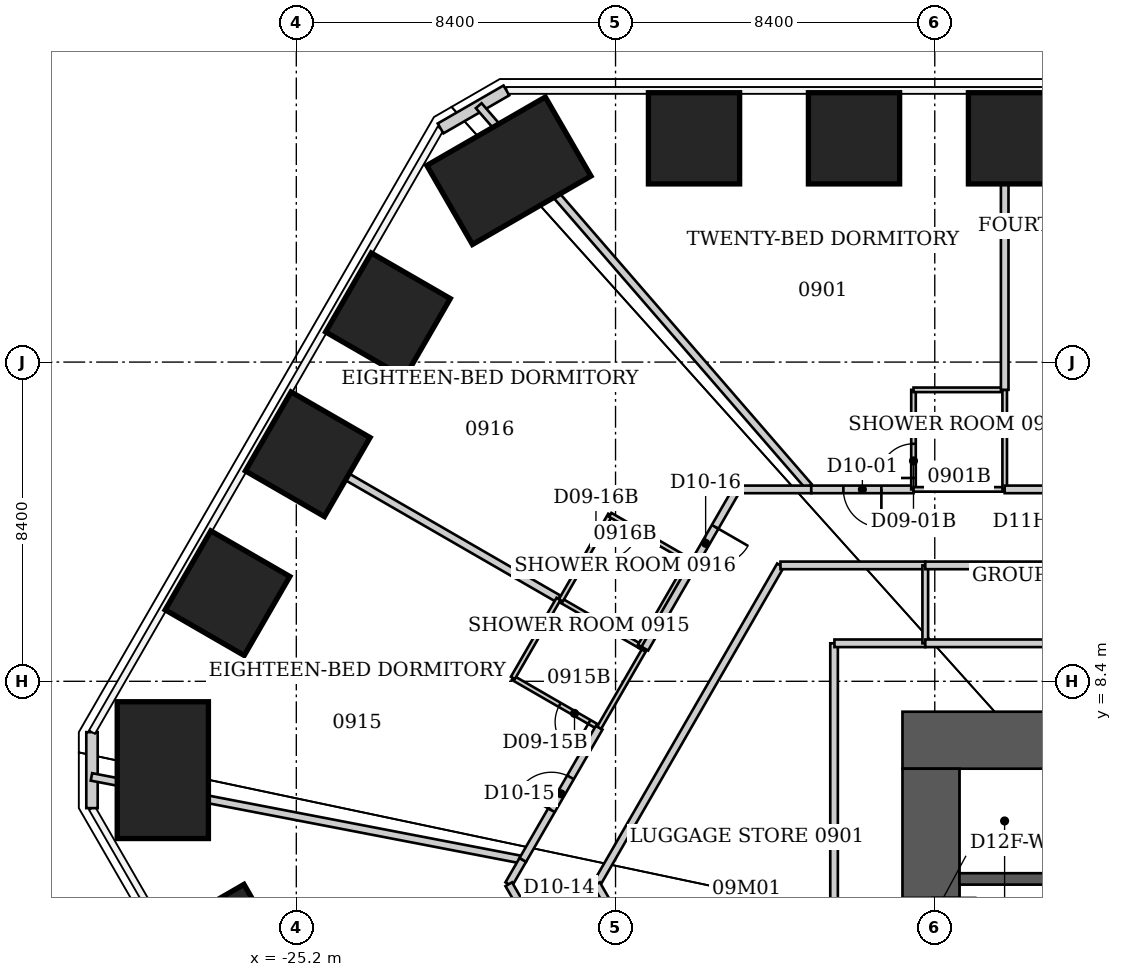
"""IFC4 building model, lengths in metres.
Left out: names, types, materials, properties, quantities, classifications, styles, units other than length and angle.
Written with IfcOpenShell. Run it as: python <this file> out.ifc"""

import sys

from ifc_helpers import new_model, si_unit, direction, frame, frame_2d, origin, origin_2d, place, context, subcontext, project, spatial, rectangle, extrude, element, fill, save


model = new_model("IFC4")
c1 = context("Model", 3, precision=1e-05, world=origin(), true_north=direction((0.0, 1.0)))
c2 = subcontext(c1, "Body", "Model", "MODEL_VIEW")
j1 = project(units=[si_unit("LENGTHUNIT", "METRE"), si_unit("PLANEANGLEUNIT", "RADIAN")], contexts=[c1])
p1 = place(None, origin())
s1 = spatial("IfcSite", under=j1, at=p1, CompositionType="ELEMENT")
p2 = place(p1, origin())
s2 = spatial("IfcBuilding", under=s1, at=p2, CompositionType="ELEMENT")
p3 = place(p2, frame((0.0, 0.0, 42.0)))
s3 = spatial("IfcBuildingStorey", under=s2, at=p3, CompositionType="ELEMENT", Elevation=42.0)
for number, where, z_axis, x_axis in (
    (1, (-14.735, 22.689, 0.0), (0.0, 0.0, 1.0), (0.0, 1.0, 0.0)),
    (2, (-10.525, 22.689, 0.0), (0.0, 0.0, 1.0), (0.0, 1.0, 0.0)),
    (3, (-6.315, 22.689, 0.0), (0.0, 0.0, 1.0), (0.0, 1.0, 0.0)),
    (4, (-27.016, 1.416, 0.0), (0.0, 0.0, 1.0), (-0.866, -0.5, 0.0)),
):
    element("IfcColumn", number, at=place(p3, frame(where, z_axis=z_axis, x_axis=x_axis)), inside=s3, PredefinedType="COLUMN", context=c2, shape_type="SweptSolid", body=[
        extrude(rectangle(XDim=2.4, YDim=2.4, at=origin_2d()), origin(), (0.0, 0.0, 1.0), 3.8),
    ])
p4 = place(p3, frame((-28.713, 6.062, 0.0), z_axis=(0.0, 0.0, 1.0), x_axis=(-1.0, 0.0, 0.0)))
e5 = element("IfcColumn", 5, at=p4, inside=s3, PredefinedType="COLUMN", context=c2, shape_type="SweptSolid", body=[
    extrude(rectangle(XDim=2.4, YDim=3.6, at=origin_2d()), origin(), (0.0, 0.0, 1.0), 3.8),
])
for number, where, z_axis, x_axis in (
    (6, (-27.01, 10.719, 0.0), (0.0, 0.0, 1.0), (-0.866, 0.5, 0.0)),
    (7, (-24.899, 14.375, 0.0), (0.0, 0.0, 1.0), (-0.866, 0.5, 0.0)),
    (8, (-22.788, 18.032, 0.0), (0.0, 0.0, 1.0), (-0.866, 0.5, 0.0)),
):
    element("IfcColumn", number, at=place(p3, frame(where, z_axis=z_axis, x_axis=x_axis)), inside=s3, PredefinedType="COLUMN", context=c2, shape_type="SweptSolid", body=[
        extrude(rectangle(XDim=2.4, YDim=2.4, at=origin_2d()), origin(), (0.0, 0.0, 1.0), 3.8),
    ])
p5 = place(p3, frame((-19.606, 21.835, 0.0), z_axis=(0.0, 0.0, 1.0), x_axis=(-0.5, 0.866025403784, 0.0)))
e9 = element("IfcColumn", 9, at=p5, inside=s3, PredefinedType="COLUMN", context=c2, shape_type="SweptSolid", body=[
    extrude(rectangle(XDim=2.4, YDim=3.6, at=origin_2d()), origin(), (0.0, 0.0, 1.0), 3.8),
])
p6 = place(p3, frame((-9.25, 6.85, 0.0), z_axis=(0.0, 0.0, 1.0), x_axis=(1.0, 0.0, 0.0)))
e10 = element("IfcWall", 10, at=p6, inside=s3, PredefinedType="SHEAR", context=c2, shape_type="SweptSolid", body=[
    extrude(rectangle(XDim=18.5, YDim=1.5, at=frame_2d((9.25, 0.0))), origin(), (0.0, 0.0, 1.0), 3.8),
])
p7 = place(p3, frame((-8.5, -9.2, 0.0), z_axis=(0.0, 0.0, 1.0), x_axis=(0.0, 1.0, 0.0)))
e11 = element("IfcWall", 11, at=p7, inside=s3, PredefinedType="SHEAR", context=c2, shape_type="SweptSolid", body=[
    extrude(rectangle(XDim=15.3, YDim=1.5, at=frame_2d((7.65, 0.0))), origin(), (0.0, 0.0, 1.0), 3.8),
])
p8 = place(p7, frame((10.7, 0.0, 0.0)))
e12 = element("IfcOpeningElement", 12, at=p8, cuts=e11, PredefinedType="OPENING", context=c2, shape_type="SweptSolid", body=[
    extrude(rectangle(XDim=1.2, YDim=2.2, at=frame_2d((0.6, 1.1))), frame((0.0, 0.75, 0.0), z_axis=(0.0, -1.0, 0.0), x_axis=(1.0, 0.0, 0.0)), (0.0, 0.0, 1.0), 1.5),
])
p9 = place(p3, frame((-7.75, 3.2, 0.0), z_axis=(0.0, 0.0, 1.0), x_axis=(1.0, 0.0, 0.0)))
e13 = element("IfcWall", 13, at=p9, inside=s3, PredefinedType="SHEAR", context=c2, shape_type="SweptSolid", body=[
    extrude(rectangle(XDim=15.5, YDim=0.3, at=frame_2d((7.75, 0.0))), origin(), (0.0, 0.0, 1.0), 3.8),
])
p10 = place(p9, frame((5.944, 0.0, 0.0)))
e14 = element("IfcOpeningElement", 14, at=p10, cuts=e13, PredefinedType="OPENING", context=c2, shape_type="SweptSolid", body=[
    extrude(rectangle(XDim=1.1, YDim=2.2, at=frame_2d((0.55, 1.1))), frame((0.0, 0.15, 0.0), z_axis=(0.0, -1.0, 0.0), x_axis=(1.0, 0.0, 0.0)), (0.0, 0.0, 1.0), 0.3),
])
p11 = place(p9, frame((11.144, 0.0, 0.0)))
e15 = element("IfcOpeningElement", 15, at=p11, cuts=e13, PredefinedType="OPENING", context=c2, shape_type="SweptSolid", body=[
    extrude(rectangle(XDim=1.1, YDim=2.2, at=frame_2d((0.55, 1.1))), frame((0.0, 0.15, 0.0), z_axis=(0.0, -1.0, 0.0), x_axis=(1.0, 0.0, 0.0)), (0.0, 0.0, 1.0), 0.3),
])
for number, where, z_axis, x_axis in (
    (16, (-30.576, 5.062, 0.0), (0.0, 0.0, 1.0), (0.0, 1.0, 0.0)),
    (17, (-21.404, 22.949, 0.0), (0.0, 0.0, 1.0), (0.866, 0.5, 0.0)),
):
    element("IfcWall", number, at=place(p3, frame(where, z_axis=z_axis, x_axis=x_axis)), inside=s3, PredefinedType="SOLIDWALL", context=c2, shape_type="SweptSolid", body=[
        extrude(rectangle(XDim=2.0, YDim=0.3, at=frame_2d((1.0, 0.0))), origin(), (0.0, 0.0, 1.0), 3.64),
    ])
p12 = place(p3, frame((-30.591, 5.884, 0.0), z_axis=(0.0, 0.0, 1.0), x_axis=(0.981983289605, -0.188967772219, 0.0)))
e18 = element("IfcWall", 18, at=p12, inside=s3, PredefinedType="PARTITIONING", context=c2, shape_type="SweptSolid", body=[
    extrude(rectangle(XDim=11.509, YDim=0.2, at=frame_2d((5.754, 0.0))), origin(), (0.0, 0.0, 1.0), 3.64),
])
p13 = place(p3, frame((-25.886, 14.95, 0.0), z_axis=(0.0, 0.0, 1.0), x_axis=(0.866018495177, -0.500011965869, 0.0)))
e19 = element("IfcWall", 19, at=p13, inside=s3, PredefinedType="PARTITIONING", context=c2, shape_type="SweptSolid", body=[
    extrude(rectangle(XDim=8.76, YDim=0.2, at=frame_2d((4.38, 0.0))), origin(), (0.0, 0.0, 1.0), 2.86),
])
p14 = place(p3, frame((-19.61, 3.06, 0.0), z_axis=(0.0, 0.0, 1.0), x_axis=(0.50068472101, 0.865629718844, 0.0)))
e20 = element("IfcWall", 20, at=p14, inside=s3, PredefinedType="PARTITIONING", context=c2, shape_type="SweptSolid", body=[
    extrude(rectangle(XDim=0.739, YDim=0.2, at=frame_2d((0.37, 0.0))), origin(), (0.0, 0.0, 1.0), 3.64),
])
p15 = place(p3, frame((-19.61, 3.06, 0.0), z_axis=(0.0, 0.0, 1.0), x_axis=(0.499983910424, -0.866034692906, 0.0)))
e21 = element("IfcWall", 21, at=p15, inside=s3, PredefinedType="PARTITIONING", context=c2, shape_type="SweptSolid", body=[
    extrude(rectangle(XDim=5.901, YDim=0.2, at=frame_2d((2.95, 0.0))), origin(), (0.0, 0.0, 1.0), 3.64),
])
p16 = place(p15, frame((2.15, 0.0, 0.0)))
e22 = element("IfcOpeningElement", 22, at=p16, cuts=e21, PredefinedType="OPENING", context=c2, shape_type="SweptSolid", body=[
    extrude(rectangle(XDim=1.0, YDim=2.13, at=frame_2d((0.5, 1.065))), frame((0.0, 0.1, 0.0), z_axis=(0.0, -1.0, 0.0), x_axis=(1.0, 0.0, 0.0)), (0.0, 0.0, 1.0), 0.2),
])
p17 = place(p3, frame((-19.5, 8.49, 0.0), z_axis=(0.0, 0.0, 1.0), x_axis=(0.866114241029, -0.499846097802, 0.0)))
e23 = element("IfcWall", 23, at=p17, inside=s3, PredefinedType="PARTITIONING", context=c2, shape_type="SweptSolid", body=[
    extrude(rectangle(XDim=2.621, YDim=0.12, at=frame_2d((1.311, 0.0))), origin(), (0.0, 0.0, 1.0), 3.64),
])
p18 = place(p17, frame((1.421, 0.0, 0.0)))
e24 = element("IfcOpeningElement", 24, at=p18, cuts=e23, PredefinedType="OPENING", context=c2, shape_type="SweptSolid", body=[
    extrude(rectangle(XDim=0.9, YDim=2.03, at=frame_2d((0.45, 1.015))), frame((0.0, 0.06, 0.0), z_axis=(0.0, -1.0, 0.0), x_axis=(1.0, 0.0, 0.0)), (0.0, 0.0, 1.0), 0.12),
])
p19 = place(p3, frame((-19.24, 3.7, 0.0), z_axis=(0.0, 0.0, 1.0), x_axis=(0.500157149565, 0.865934654428, 0.0)))
e25 = element("IfcWall", 25, at=p19, inside=s3, PredefinedType="PARTITIONING", context=c2, shape_type="SweptSolid", body=[
    extrude(rectangle(XDim=4.019, YDim=0.2, at=frame_2d((2.009, 0.0))), origin(), (0.0, 0.0, 1.0), 3.64),
])
p20 = place(p19, frame((1.51, 0.0, 0.0)))
e26 = element("IfcOpeningElement", 26, at=p20, cuts=e25, PredefinedType="OPENING", context=c2, shape_type="SweptSolid", body=[
    extrude(rectangle(XDim=1.0, YDim=2.13, at=frame_2d((0.5, 1.065))), frame((0.0, 0.1, 0.0), z_axis=(0.0, -1.0, 0.0), x_axis=(1.0, 0.0, 0.0)), (0.0, 0.0, 1.0), 0.2),
])
p21 = place(p3, frame((-18.3, 10.57, 0.0), z_axis=(0.0, 0.0, 1.0), x_axis=(-0.499693115345, -0.866202511239, 0.0)))
e27 = element("IfcWall", 27, at=p21, inside=s3, PredefinedType="PARTITIONING", context=c2, shape_type="SweptSolid", body=[
    extrude(rectangle(XDim=2.401, YDim=0.12, at=frame_2d((1.201, 0.0))), origin(), (0.0, 0.0, 1.0), 3.64),
])
p22 = place(p3, frame((-18.24, 10.53, 0.0), z_axis=(0.0, 0.0, 1.0), x_axis=(0.866202511239, -0.499693115345, 0.0)))
e28 = element("IfcWall", 28, at=p22, inside=s3, PredefinedType="PARTITIONING", context=c2, shape_type="SweptSolid", body=[
    extrude(rectangle(XDim=2.401, YDim=0.12, at=frame_2d((1.201, 0.0))), origin(), (0.0, 0.0, 1.0), 2.86),
])
p23 = place(p3, frame((-17.3, 3.06, 0.0), z_axis=(0.0, 0.0, 1.0), x_axis=(0.499704269421, 0.866196076603, 0.0)))
e29 = element("IfcWall", 29, at=p23, inside=s3, PredefinedType="PARTITIONING", context=c2, shape_type="SweptSolid", body=[
    extrude(rectangle(XDim=9.686, YDim=0.2, at=frame_2d((4.843, 0.0))), origin(), (0.0, 0.0, 1.0), 3.64),
])
p24 = place(p3, frame((-17.23, 7.18, 0.0), z_axis=(0.0, 0.0, 1.0), x_axis=(0.500009943768, 0.866019662671, 0.0)))
e30 = element("IfcWall", 30, at=p24, inside=s3, PredefinedType="PARTITIONING", context=c2, shape_type="SweptSolid", body=[
    extrude(rectangle(XDim=2.401, YDim=0.12, at=frame_2d((1.201, 0.0))), origin(), (0.0, 0.0, 1.0), 3.64),
])
p25 = place(p3, frame((-16.94, 12.78, 0.0), z_axis=(0.0, 0.0, 1.0), x_axis=(-0.500291685314, -0.865856933682, 0.0)))
e31 = element("IfcWall", 31, at=p25, inside=s3, PredefinedType="PARTITIONING", context=c2, shape_type="SweptSolid", body=[
    extrude(rectangle(XDim=2.599, YDim=0.12, at=frame_2d((1.299, 0.0))), origin(), (0.0, 0.0, 1.0), 3.64),
])
p26 = place(p25, frame((0.3, 0.0, 0.0)))
e32 = element("IfcOpeningElement", 32, at=p26, cuts=e31, PredefinedType="OPENING", context=c2, shape_type="SweptSolid", body=[
    extrude(rectangle(XDim=0.9, YDim=2.03, at=frame_2d((0.45, 1.015))), frame((0.0, 0.06, 0.0), z_axis=(0.0, -1.0, 0.0), x_axis=(1.0, 0.0, 0.0)), (0.0, 0.0, 1.0), 0.12),
])
p27 = place(p3, frame((-16.16, 9.33, 0.0), z_axis=(0.0, 0.0, 1.0), x_axis=(0.880098986228, -0.47479024257, 0.0)))
e33 = element("IfcWall", 33, at=p27, inside=s3, PredefinedType="PARTITIONING", context=c2, shape_type="SweptSolid", body=[
    extrude(rectangle(XDim=0.147, YDim=0.12, at=frame_2d((0.074, 0.0))), origin(), (0.0, 0.0, 1.0), 3.64),
])
p28 = place(p3, frame((-16.16, 9.33, 0.0), z_axis=(0.0, 0.0, 1.0), x_axis=(0.500291685314, 0.865856933682, 0.0)))
e34 = element("IfcWall", 34, at=p28, inside=s3, PredefinedType="PARTITIONING", context=c2, shape_type="SweptSolid", body=[
    extrude(rectangle(XDim=2.599, YDim=0.12, at=frame_2d((1.299, 0.0))), origin(), (0.0, 0.0, 1.0), 3.64),
])
p29 = place(p3, frame((-16.029, 9.26, 0.0), z_axis=(0.0, 0.0, 1.0), x_axis=(0.499975779801, 0.866039386871, 0.0)))
e35 = element("IfcWall", 35, at=p29, inside=s3, PredefinedType="PARTITIONING", context=c2, shape_type="SweptSolid", body=[
    extrude(rectangle(XDim=4.839, YDim=0.2, at=frame_2d((2.419, 0.0))), origin(), (0.0, 0.0, 1.0), 3.64),
])
p30 = place(p29, frame((2.7, 0.0, 0.0)))
e36 = element("IfcOpeningElement", 36, at=p30, cuts=e35, PredefinedType="OPENING", context=c2, shape_type="SweptSolid", body=[
    extrude(rectangle(XDim=1.0, YDim=2.13, at=frame_2d((0.5, 1.065))), frame((0.0, 0.1, 0.0), z_axis=(0.0, -1.0, 0.0), x_axis=(1.0, 0.0, 0.0)), (0.0, 0.0, 1.0), 0.2),
])
p31 = place(p3, frame((-14.86, 11.58, 0.0), z_axis=(0.0, 0.0, 1.0), x_axis=(-0.866177122335, 0.499737123639, 0.0)))
e37 = element("IfcWall", 37, at=p31, inside=s3, PredefinedType="PARTITIONING", context=c2, shape_type="SweptSolid", body=[
    extrude(rectangle(XDim=2.401, YDim=0.12, at=frame_2d((1.201, 0.0))), origin(), (0.0, 0.0, 1.0), 3.64),
])
p32 = place(p3, frame((-12.46, 11.45, 0.0), z_axis=(0.0, 0.0, 1.0), x_axis=(1.0, 0.0, 0.0)))
e38 = element("IfcWall", 38, at=p32, inside=s3, PredefinedType="PARTITIONING", context=c2, shape_type="SweptSolid", body=[
    extrude(rectangle(XDim=3.81, YDim=0.2, at=frame_2d((1.905, 0.0))), origin(), (0.0, 0.0, 1.0), 3.64),
])
p33 = place(p3, frame((-11.716, 13.526, 0.0), z_axis=(0.0, 0.0, 1.0), x_axis=(-0.654901100514, 0.755714594636, 0.0)))
e39 = element("IfcWall", 39, at=p33, inside=s3, PredefinedType="PARTITIONING", context=c2, shape_type="SweptSolid", body=[
    extrude(rectangle(XDim=13.261, YDim=0.2, at=frame_2d((6.631, 0.0))), origin(), (0.0, 0.0, 1.0), 3.64),
])
p34 = place(p3, frame((-11.65, 13.45, 0.0), z_axis=(0.0, 0.0, 1.0), x_axis=(-1.0, 0.0, 0.0)))
e40 = element("IfcWall", 40, at=p34, inside=s3, PredefinedType="PARTITIONING", context=c2, shape_type="SweptSolid", body=[
    extrude(rectangle(XDim=1.96, YDim=0.2, at=frame_2d((0.98, 0.0))), origin(), (0.0, 0.0, 1.0), 3.64),
])
p35 = place(p3, frame((-11.16, -7.57, 0.0), z_axis=(0.0, 0.0, 1.0), x_axis=(-0.500175206663, 0.865924224537, 0.0)))
e41 = element("IfcWall", 41, at=p35, inside=s3, PredefinedType="PARTITIONING", context=c2, shape_type="SweptSolid", body=[
    extrude(rectangle(XDim=12.275, YDim=0.2, at=frame_2d((6.138, 0.0))), origin(), (0.0, 0.0, 1.0), 3.64),
])
p36 = place(p3, frame((-11.05, 9.4, 0.0), z_axis=(0.0, 0.0, 1.0), x_axis=(0.0, -1.0, 0.0)))
e42 = element("IfcWall", 42, at=p36, inside=s3, PredefinedType="PARTITIONING", context=c2, shape_type="SweptSolid", body=[
    extrude(rectangle(XDim=17.16, YDim=0.2, at=frame_2d((8.58, 0.0))), origin(), (0.0, 0.0, 1.0), 3.64),
])
p37 = place(p36, frame((8.03, 0.0, 0.0)))
e43 = element("IfcOpeningElement", 43, at=p37, cuts=e42, PredefinedType="OPENING", context=c2, shape_type="SweptSolid", body=[
    extrude(rectangle(XDim=1.1, YDim=2.2, at=frame_2d((0.55, 1.1))), frame((0.0, 0.1, 0.0), z_axis=(0.0, -1.0, 0.0), x_axis=(1.0, 0.0, 0.0)), (0.0, 0.0, 1.0), 0.2),
])
p38 = place(p3, frame((-8.96, 13.45, 0.0), z_axis=(0.0, 0.0, 1.0), x_axis=(-1.0, 0.0, 0.0)))
e44 = element("IfcWall", 44, at=p38, inside=s3, PredefinedType="PARTITIONING", context=c2, shape_type="SweptSolid", body=[
    extrude(rectangle(XDim=2.69, YDim=0.2, at=frame_2d((1.345, 0.0))), origin(), (0.0, 0.0, 1.0), 3.64),
])
p39 = place(p38, frame((0.845, 0.0, 0.0)))
e45 = element("IfcOpeningElement", 45, at=p39, cuts=e44, PredefinedType="OPENING", context=c2, shape_type="SweptSolid", body=[
    extrude(rectangle(XDim=1.0, YDim=2.13, at=frame_2d((0.5, 1.065))), frame((0.0, 0.1, 0.0), z_axis=(0.0, -1.0, 0.0), x_axis=(1.0, 0.0, 0.0)), (0.0, 0.0, 1.0), 0.2),
])
p40 = place(p3, frame((-8.96, 16.07, 0.0), z_axis=(0.0, 0.0, 1.0), x_axis=(0.0, -1.0, 0.0)))
e46 = element("IfcWall", 46, at=p40, inside=s3, PredefinedType="PARTITIONING", context=c2, shape_type="SweptSolid", body=[
    extrude(rectangle(XDim=2.62, YDim=0.12, at=frame_2d((1.31, 0.0))), origin(), (0.0, 0.0, 1.0), 3.64),
])
p41 = place(p40, frame((1.42, 0.0, 0.0)))
e47 = element("IfcOpeningElement", 47, at=p41, cuts=e46, PredefinedType="OPENING", context=c2, shape_type="SweptSolid", body=[
    extrude(rectangle(XDim=0.9, YDim=2.03, at=frame_2d((0.45, 1.015))), frame((0.0, 0.06, 0.0), z_axis=(0.0, -1.0, 0.0), x_axis=(1.0, 0.0, 0.0)), (0.0, 0.0, 1.0), 0.12),
])
p42 = place(p3, frame((-8.65, 9.4, 0.0), z_axis=(0.0, 0.0, 1.0), x_axis=(-1.0, 0.0, 0.0)))
e48 = element("IfcWall", 48, at=p42, inside=s3, PredefinedType="PARTITIONING", context=c2, shape_type="SweptSolid", body=[
    extrude(rectangle(XDim=2.39, YDim=0.2, at=frame_2d((1.195, 0.0))), origin(), (0.0, 0.0, 1.0), 3.64),
])
p43 = place(p3, frame((-8.65, 11.45, 0.0), z_axis=(0.0, 0.0, 1.0), x_axis=(0.0, -1.0, 0.0)))
e49 = element("IfcWall", 49, at=p43, inside=s3, PredefinedType="PARTITIONING", context=c2, shape_type="SweptSolid", body=[
    extrude(rectangle(XDim=2.05, YDim=0.15, at=frame_2d((1.025, 0.0))), origin(), (0.0, 0.0, 1.0), 3.64),
])
p44 = place(p3, frame((-8.65, 11.45, 0.0), z_axis=(0.0, 0.0, 1.0), x_axis=(1.0, 0.0, 0.0)))
e50 = element("IfcWall", 50, at=p44, inside=s3, PredefinedType="PARTITIONING", context=c2, shape_type="SweptSolid", body=[
    extrude(rectangle(XDim=8.65, YDim=0.2, at=frame_2d((4.325, 0.0))), origin(), (0.0, 0.0, 1.0), 3.64),
])
p45 = place(p44, frame((3.775, 0.0, 0.0)))
e51 = element("IfcOpeningElement", 51, at=p45, cuts=e50, PredefinedType="OPENING", context=c2, shape_type="SweptSolid", body=[
    extrude(rectangle(XDim=1.1, YDim=2.2, at=frame_2d((0.55, 1.1))), frame((0.0, 0.1, 0.0), z_axis=(0.0, -1.0, 0.0), x_axis=(1.0, 0.0, 0.0)), (0.0, 0.0, 1.0), 0.2),
])
for number, where, z_axis, x_axis in (
    (52, (-6.56, 13.45, 0.0), (0.0, 0.0, 1.0), (-1.0, 0.0, 0.0)),
    (53, (-6.56, 16.07, 0.0), (0.0, 0.0, 1.0), (-1.0, 0.0, 0.0)),
):
    element("IfcWall", number, at=place(p3, frame(where, z_axis=z_axis, x_axis=x_axis)), inside=s3, PredefinedType="PARTITIONING", context=c2, shape_type="SweptSolid", body=[
        extrude(rectangle(XDim=2.4, YDim=0.12, at=frame_2d((1.2, 0.0))), origin(), (0.0, 0.0, 1.0), 3.64),
    ])
p46 = place(p3, frame((-6.56, 16.07, 0.0), z_axis=(0.0, 0.0, 1.0), x_axis=(0.0, -1.0, 0.0)))
e54 = element("IfcWall", 54, at=p46, inside=s3, PredefinedType="PARTITIONING", context=c2, shape_type="SweptSolid", body=[
    extrude(rectangle(XDim=2.62, YDim=0.12, at=frame_2d((1.31, 0.0))), origin(), (0.0, 0.0, 1.0), 3.64),
])
p47 = place(p3, frame((-6.56, 23.83, 0.0), z_axis=(0.0, 0.0, 1.0), x_axis=(0.0, -1.0, 0.0)))
e55 = element("IfcWall", 55, at=p47, inside=s3, PredefinedType="PARTITIONING", context=c2, shape_type="SweptSolid", body=[
    extrude(rectangle(XDim=7.76, YDim=0.2, at=frame_2d((3.88, 0.0))), origin(), (0.0, 0.0, 1.0), 3.64),
])
p48 = place(p3, frame((-2.4, 13.45, 0.0), z_axis=(0.0, 0.0, 1.0), x_axis=(-1.0, 0.0, 0.0)))
e56 = element("IfcWall", 56, at=p48, inside=s3, PredefinedType="PARTITIONING", context=c2, shape_type="SweptSolid", body=[
    extrude(rectangle(XDim=4.16, YDim=0.2, at=frame_2d((2.08, 0.0))), origin(), (0.0, 0.0, 1.0), 3.64),
])
p49 = place(p48, frame((1.58, 0.0, 0.0)))
e57 = element("IfcOpeningElement", 57, at=p49, cuts=e56, PredefinedType="OPENING", context=c2, shape_type="SweptSolid", body=[
    extrude(rectangle(XDim=1.0, YDim=2.13, at=frame_2d((0.5, 1.065))), frame((0.0, 0.1, 0.0), z_axis=(0.0, -1.0, 0.0), x_axis=(1.0, 0.0, 0.0)), (0.0, 0.0, 1.0), 0.2),
])
p50 = place(p3, frame((0.0, 9.4, 0.0), z_axis=(0.0, 0.0, 1.0), x_axis=(-1.0, 0.0, 0.0)))
e58 = element("IfcWall", 58, at=p50, inside=s3, PredefinedType="PARTITIONING", context=c2, shape_type="SweptSolid", body=[
    extrude(rectangle(XDim=8.65, YDim=0.2, at=frame_2d((4.325, 0.0))), origin(), (0.0, 0.0, 1.0), 3.64),
])
p51 = place(p39, origin())
e59 = element("IfcDoor", 59, at=p51, inside=s3, OperationType="SINGLE_SWING_LEFT", PredefinedType="DOOR", context=c2, shape_type="SweptSolid", body=[
    extrude(rectangle(XDim=1.0, YDim=2.13, at=frame_2d((0.5, 1.065))), frame((0.0, 0.025, 0.0), z_axis=(0.0, -1.0, 0.0), x_axis=(1.0, 0.0, 0.0)), (0.0, 0.0, 1.0), 0.05),
])
fill(e45, e59)
p52 = place(p41, origin())
e60 = element("IfcDoor", 60, at=p52, inside=s3, OperationType="SINGLE_SWING_RIGHT", PredefinedType="DOOR", context=c2, shape_type="SweptSolid", body=[
    extrude(rectangle(XDim=0.9, YDim=2.03, at=frame_2d((0.45, 1.015))), frame((0.0, 0.025, 0.0), z_axis=(0.0, -1.0, 0.0), x_axis=(1.0, 0.0, 0.0)), (0.0, 0.0, 1.0), 0.05),
])
fill(e47, e60)
p53 = place(p20, origin())
e61 = element("IfcDoor", 61, at=p53, inside=s3, OperationType="SINGLE_SWING_LEFT", PredefinedType="DOOR", context=c2, shape_type="SweptSolid", body=[
    extrude(rectangle(XDim=1.0, YDim=2.13, at=frame_2d((0.5, 1.065))), frame((0.0, 0.025, 0.0), z_axis=(0.0, -1.0, 0.0), x_axis=(1.0, 0.0, 0.0)), (0.0, 0.0, 1.0), 0.05),
])
fill(e26, e61)
p54 = place(p18, origin())
e62 = element("IfcDoor", 62, at=p54, inside=s3, OperationType="SINGLE_SWING_RIGHT", PredefinedType="DOOR", context=c2, shape_type="SweptSolid", body=[
    extrude(rectangle(XDim=0.9, YDim=2.03, at=frame_2d((0.45, 1.015))), frame((0.0, 0.025, 0.0), z_axis=(0.0, -1.0, 0.0), x_axis=(1.0, 0.0, 0.0)), (0.0, 0.0, 1.0), 0.05),
])
fill(e24, e62)
p55 = place(p30, origin())
e63 = element("IfcDoor", 63, at=p55, inside=s3, OperationType="SINGLE_SWING_RIGHT", PredefinedType="DOOR", context=c2, shape_type="SweptSolid", body=[
    extrude(rectangle(XDim=1.0, YDim=2.13, at=frame_2d((0.5, 1.065))), frame((0.0, 0.025, 0.0), z_axis=(0.0, -1.0, 0.0), x_axis=(1.0, 0.0, 0.0)), (0.0, 0.0, 1.0), 0.05),
])
fill(e36, e63)
p56 = place(p26, origin())
e64 = element("IfcDoor", 64, at=p56, inside=s3, OperationType="SINGLE_SWING_LEFT", PredefinedType="DOOR", context=c2, shape_type="SweptSolid", body=[
    extrude(rectangle(XDim=0.9, YDim=2.03, at=frame_2d((0.45, 1.015))), frame((0.0, 0.025, 0.0), z_axis=(0.0, -1.0, 0.0), x_axis=(1.0, 0.0, 0.0)), (0.0, 0.0, 1.0), 0.05),
])
fill(e32, e64)
save(model, sys.argv[1])
